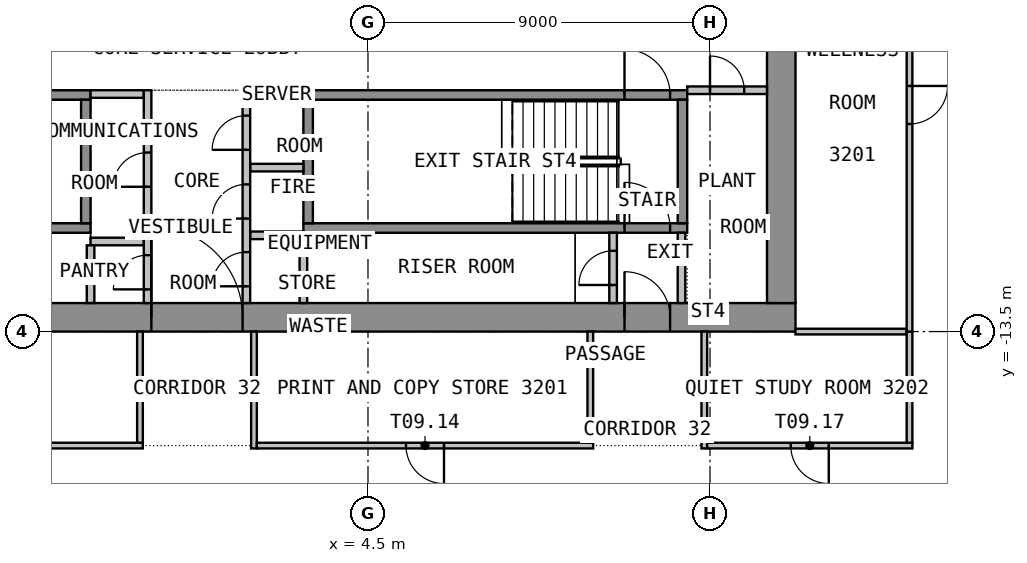
"""IFC4 building model, lengths in metres.
Left out: names, types, materials, properties, quantities, classifications, styles, units other than length and angle.
Written with IfcOpenShell. Run it as: python <this file> out.ifc"""

import sys

from ifc_helpers import new_model, si_unit, direction, frame, frame_2d, origin, place, context, subcontext, project, spatial, rectangle, extrude, element, fill, save


model = new_model("IFC4")
c1 = context("Model", 3, precision=1e-05, world=origin(), true_north=direction((0.0, 1.0)))
c2 = subcontext(c1, "Body", "Model", "MODEL_VIEW")
j1 = project(units=[si_unit("LENGTHUNIT", "METRE"), si_unit("PLANEANGLEUNIT", "RADIAN")], contexts=[c1])
p1 = place(None, origin())
s1 = spatial("IfcSite", under=j1, at=p1, CompositionType="ELEMENT")
p2 = place(p1, origin())
s2 = spatial("IfcBuilding", under=s1, at=p2, CompositionType="ELEMENT")
p3 = place(p2, frame((0.0, 0.0, 132.6)))
s3 = spatial("IfcBuildingStorey", under=s2, at=p3, CompositionType="ELEMENT", Elevation=132.6)
p4 = place(p3, frame((-15.75, -13.125, 0.0), z_axis=(0.0, 0.0, 1.0), x_axis=(1.0, 0.0, 0.0)))
e1 = element("IfcWall", 1, at=p4, inside=s3, PredefinedType="SHEAR", context=c2, shape_type="SweptSolid", body=[
    extrude(rectangle(XDim=31.5, YDim=0.75, at=frame_2d((15.75, 0.0))), origin(), (0.0, 0.0, 1.0), 3.575),
])
p5 = place(p4, frame((14.55, 0.0, 0.0)))
e2 = element("IfcOpeningElement", 2, at=p5, cuts=e1, PredefinedType="OPENING", context=c2, shape_type="SweptSolid", body=[
    extrude(rectangle(XDim=2.4, YDim=2.1, at=frame_2d((1.2, 1.05))), frame((0.0, 0.385, 0.0), z_axis=(0.0, -1.0, 0.0), x_axis=(1.0, 0.0, 0.0)), (0.0, 0.0, 1.0), 0.77),
])
p6 = place(p4, frame((3.3, 0.0, 0.0)))
e3 = element("IfcOpeningElement", 3, at=p6, cuts=e1, PredefinedType="OPENING", context=c2, shape_type="SweptSolid", body=[
    extrude(rectangle(XDim=1.2, YDim=2.1, at=frame_2d((0.6, 1.05))), frame((0.0, 0.385, 0.0), z_axis=(0.0, -1.0, 0.0), x_axis=(1.0, 0.0, 0.0)), (0.0, 0.0, 1.0), 0.77),
])
p7 = place(p4, frame((27.0, 0.0, 0.0)))
e4 = element("IfcOpeningElement", 4, at=p7, cuts=e1, PredefinedType="OPENING", context=c2, shape_type="SweptSolid", body=[
    extrude(rectangle(XDim=1.2, YDim=2.1, at=frame_2d((0.6, 1.05))), frame((0.0, 0.385, 0.0), z_axis=(0.0, -1.0, 0.0), x_axis=(1.0, 0.0, 0.0)), (0.0, 0.0, 1.0), 0.77),
])
p8 = place(p3, frame((15.375, -12.75, 0.0), z_axis=(0.0, 0.0, 1.0), x_axis=(0.0, 1.0, 0.0)))
e5 = element("IfcWall", 5, at=p8, inside=s3, PredefinedType="SHEAR", context=c2, shape_type="SweptSolid", body=[
    extrude(rectangle(XDim=25.5, YDim=0.75, at=frame_2d((12.75, 0.0))), origin(), (0.0, 0.0, 1.0), 3.575),
])
p9 = place(p8, frame((11.55, 0.0, 0.0)))
e6 = element("IfcOpeningElement", 6, at=p9, cuts=e5, PredefinedType="OPENING", context=c2, shape_type="SweptSolid", body=[
    extrude(rectangle(XDim=2.4, YDim=2.1, at=frame_2d((1.2, 1.05))), frame((0.0, 0.385, 0.0), z_axis=(0.0, -1.0, 0.0), x_axis=(1.0, 0.0, 0.0)), (0.0, 0.0, 1.0), 0.77),
])
p10 = place(p3, frame((-12.9, -10.775, 0.0), z_axis=(0.0, 0.0, 1.0), x_axis=(1.0, 0.0, 0.0)))
e7 = element("IfcWall", 7, at=p10, inside=s3, PredefinedType="SHEAR", context=c2, shape_type="SweptSolid", body=[
    extrude(rectangle(XDim=10.1, YDim=0.25, at=frame_2d((5.05, 0.0))), origin(), (0.0, 0.0, 1.0), 3.575),
])
p11 = place(p10, frame((0.45, 0.0, 0.0)))
e8 = element("IfcOpeningElement", 8, at=p11, cuts=e7, PredefinedType="OPENING", context=c2, shape_type="SweptSolid", body=[
    extrude(rectangle(XDim=1.2, YDim=2.1, at=frame_2d((0.6, 1.05))), frame((0.0, 0.135, 0.0), z_axis=(0.0, -1.0, 0.0), x_axis=(1.0, 0.0, 0.0)), (0.0, 0.0, 1.0), 0.27),
])
p12 = place(p3, frame((-12.9, -7.275, 0.0), z_axis=(0.0, 0.0, 1.0), x_axis=(1.0, 0.0, 0.0)))
e9 = element("IfcWall", 9, at=p12, inside=s3, PredefinedType="SHEAR", context=c2, shape_type="SweptSolid", body=[
    extrude(rectangle(XDim=10.1, YDim=0.25, at=frame_2d((5.05, 0.0))), origin(), (0.0, 0.0, 1.0), 3.575),
])
p13 = place(p12, frame((0.45, 0.0, 0.0)))
e10 = element("IfcOpeningElement", 10, at=p13, cuts=e9, PredefinedType="OPENING", context=c2, shape_type="SweptSolid", body=[
    extrude(rectangle(XDim=1.2, YDim=2.1, at=frame_2d((0.6, 1.05))), frame((0.0, 0.135, 0.0), z_axis=(0.0, -1.0, 0.0), x_axis=(1.0, 0.0, 0.0)), (0.0, 0.0, 1.0), 0.27),
])
p14 = place(p3, frame((-2.925, -10.65, 0.0), z_axis=(0.0, 0.0, 1.0), x_axis=(0.0, 1.0, 0.0)))
e11 = element("IfcWall", 11, at=p14, inside=s3, PredefinedType="SHEAR", context=c2, shape_type="SweptSolid", body=[
    extrude(rectangle(XDim=3.25, YDim=0.25, at=frame_2d((1.625, 0.0))), origin(), (0.0, 0.0, 1.0), 3.575),
])
p15 = place(p3, frame((2.8, -10.775, 0.0), z_axis=(0.0, 0.0, 1.0), x_axis=(1.0, 0.0, 0.0)))
e12 = element("IfcWall", 12, at=p15, inside=s3, PredefinedType="SHEAR", context=c2, shape_type="SweptSolid", body=[
    extrude(rectangle(XDim=10.1, YDim=0.25, at=frame_2d((5.05, 0.0))), origin(), (0.0, 0.0, 1.0), 3.575),
])
p16 = place(p15, frame((8.45, 0.0, 0.0)))
e13 = element("IfcOpeningElement", 13, at=p16, cuts=e12, PredefinedType="OPENING", context=c2, shape_type="SweptSolid", body=[
    extrude(rectangle(XDim=1.2, YDim=2.1, at=frame_2d((0.6, 1.05))), frame((0.0, 0.135, 0.0), z_axis=(0.0, -1.0, 0.0), x_axis=(1.0, 0.0, 0.0)), (0.0, 0.0, 1.0), 0.27),
])
p17 = place(p3, frame((2.8, -7.275, 0.0), z_axis=(0.0, 0.0, 1.0), x_axis=(1.0, 0.0, 0.0)))
e14 = element("IfcWall", 14, at=p17, inside=s3, PredefinedType="SHEAR", context=c2, shape_type="SweptSolid", body=[
    extrude(rectangle(XDim=10.1, YDim=0.25, at=frame_2d((5.05, 0.0))), origin(), (0.0, 0.0, 1.0), 3.575),
])
p18 = place(p17, frame((8.45, 0.0, 0.0)))
e15 = element("IfcOpeningElement", 15, at=p18, cuts=e14, PredefinedType="OPENING", context=c2, shape_type="SweptSolid", body=[
    extrude(rectangle(XDim=1.2, YDim=2.1, at=frame_2d((0.6, 1.05))), frame((0.0, 0.135, 0.0), z_axis=(0.0, -1.0, 0.0), x_axis=(1.0, 0.0, 0.0)), (0.0, 0.0, 1.0), 0.27),
])
for number, where, z_axis, x_axis in (
    (16, (2.925, -10.65, 0.0), (0.0, 0.0, 1.0), (0.0, 1.0, 0.0)),
    (17, (12.775, -10.65, 0.0), (0.0, 0.0, 1.0), (0.0, 1.0, 0.0)),
):
    element("IfcWall", number, at=place(p3, frame(where, z_axis=z_axis, x_axis=x_axis)), inside=s3, PredefinedType="SHEAR", context=c2, shape_type="SweptSolid", body=[
        extrude(rectangle(XDim=3.25, YDim=0.25, at=frame_2d((1.625, 0.0))), origin(), (0.0, 0.0, 1.0), 3.575),
    ])
for number, where, z_axis, x_axis in (
    (18, (-2.8, -7.25, 0.0), (0.0, 0.0, 1.0), (1.0, 0.0, 0.0)),
    (19, (-2.8, -11.13, 0.0), (0.0, 0.0, 1.0), (1.0, 0.0, 0.0)),
    (20, (1.4, -7.25, 0.0), (0.0, 0.0, 1.0), (1.0, 0.0, 0.0)),
    (21, (1.4, -9.186, 0.0), (0.0, 0.0, 1.0), (1.0, 0.0, 0.0)),
    (22, (1.4, -10.968, 0.0), (0.0, 0.0, 1.0), (1.0, 0.0, 0.0)),
):
    element("IfcWall", number, at=place(p3, frame(where, z_axis=z_axis, x_axis=x_axis)), inside=s3, PredefinedType="PARTITIONING", context=c2, shape_type="SweptSolid", body=[
        extrude(rectangle(XDim=1.4, YDim=0.2, at=frame_2d((0.7, 0.0))), origin(), (0.0, 0.0, 1.0), 3.575),
    ])
p19 = place(p3, frame((-1.3, -12.75, 0.0), z_axis=(0.0, 0.0, 1.0), x_axis=(0.0, 1.0, 0.0)))
e23 = element("IfcWall", 23, at=p19, inside=s3, PredefinedType="PARTITIONING", context=c2, shape_type="SweptSolid", body=[
    extrude(rectangle(XDim=5.6, YDim=0.2, at=frame_2d((2.8, 0.0))), origin(), (0.0, 0.0, 1.0), 3.575),
])
p20 = place(p19, frame((0.36, 0.0, 0.0)))
e24 = element("IfcOpeningElement", 24, at=p20, cuts=e23, PredefinedType="OPENING", context=c2, shape_type="SweptSolid", body=[
    extrude(rectangle(XDim=0.9, YDim=2.1, at=frame_2d((0.45, 1.05))), frame((0.0, 0.11, 0.0), z_axis=(0.0, -1.0, 0.0), x_axis=(1.0, 0.0, 0.0)), (0.0, 0.0, 1.0), 0.22),
])
p21 = place(p19, frame((3.06, 0.0, 0.0)))
e25 = element("IfcOpeningElement", 25, at=p21, cuts=e23, PredefinedType="OPENING", context=c2, shape_type="SweptSolid", body=[
    extrude(rectangle(XDim=0.9, YDim=2.1, at=frame_2d((0.45, 1.05))), frame((0.0, 0.11, 0.0), z_axis=(0.0, -1.0, 0.0), x_axis=(1.0, 0.0, 0.0)), (0.0, 0.0, 1.0), 0.22),
])
p22 = place(p3, frame((1.3, -12.75, 0.0), z_axis=(0.0, 0.0, 1.0), x_axis=(0.0, 1.0, 0.0)))
e26 = element("IfcWall", 26, at=p22, inside=s3, PredefinedType="PARTITIONING", context=c2, shape_type="SweptSolid", body=[
    extrude(rectangle(XDim=5.6, YDim=0.2, at=frame_2d((2.8, 0.0))), origin(), (0.0, 0.0, 1.0), 3.575),
])
p23 = place(p22, frame((0.441, 0.0, 0.0)))
e27 = element("IfcOpeningElement", 27, at=p23, cuts=e26, PredefinedType="OPENING", context=c2, shape_type="SweptSolid", body=[
    extrude(rectangle(XDim=0.9, YDim=2.1, at=frame_2d((0.45, 1.05))), frame((0.0, 0.11, 0.0), z_axis=(0.0, -1.0, 0.0), x_axis=(1.0, 0.0, 0.0)), (0.0, 0.0, 1.0), 0.22),
])
p24 = place(p22, frame((2.223, 0.0, 0.0)))
e28 = element("IfcOpeningElement", 28, at=p24, cuts=e26, PredefinedType="OPENING", context=c2, shape_type="SweptSolid", body=[
    extrude(rectangle(XDim=0.9, YDim=2.1, at=frame_2d((0.45, 1.05))), frame((0.0, 0.11, 0.0), z_axis=(0.0, -1.0, 0.0), x_axis=(1.0, 0.0, 0.0)), (0.0, 0.0, 1.0), 0.22),
])
p25 = place(p22, frame((4.032, 0.0, 0.0)))
e29 = element("IfcOpeningElement", 29, at=p25, cuts=e26, PredefinedType="OPENING", context=c2, shape_type="SweptSolid", body=[
    extrude(rectangle(XDim=0.9, YDim=2.1, at=frame_2d((0.45, 1.05))), frame((0.0, 0.11, 0.0), z_axis=(0.0, -1.0, 0.0), x_axis=(1.0, 0.0, 0.0)), (0.0, 0.0, 1.0), 0.22),
])
p26 = place(p3, frame((12.75, -12.75, 0.0), z_axis=(0.0, 0.0, 1.0), x_axis=(0.0, 1.0, 0.0)))
e30 = element("IfcWall", 30, at=p26, inside=s3, PredefinedType="PARTITIONING", context=c2, shape_type="SweptSolid", body=[
    extrude(rectangle(XDim=1.85, YDim=0.2, at=frame_2d((0.925, 0.0))), origin(), (0.0, 0.0, 1.0), 3.575),
])
p27 = place(p3, frame((10.95, -12.75, 0.0), z_axis=(0.0, 0.0, 1.0), x_axis=(0.0, 1.0, 0.0)))
e31 = element("IfcWall", 31, at=p27, inside=s3, PredefinedType="PARTITIONING", context=c2, shape_type="SweptSolid", body=[
    extrude(rectangle(XDim=1.85, YDim=0.2, at=frame_2d((0.925, 0.0))), origin(), (0.0, 0.0, 1.0), 3.575),
])
p28 = place(p27, frame((0.475, 0.0, 0.0)))
e32 = element("IfcOpeningElement", 32, at=p28, cuts=e31, PredefinedType="OPENING", context=c2, shape_type="SweptSolid", body=[
    extrude(rectangle(XDim=0.9, YDim=2.1, at=frame_2d((0.45, 1.05))), frame((0.0, 0.11, 0.0), z_axis=(0.0, -1.0, 0.0), x_axis=(1.0, 0.0, 0.0)), (0.0, 0.0, 1.0), 0.22),
])
p29 = place(p3, frame((12.9, -7.15, 0.0), z_axis=(0.0, 0.0, 1.0), x_axis=(1.0, 0.0, 0.0)))
e33 = element("IfcWall", 33, at=p29, inside=s3, PredefinedType="PARTITIONING", context=c2, shape_type="SweptSolid", body=[
    extrude(rectangle(XDim=2.1, YDim=0.2, at=frame_2d((1.05, 0.0))), origin(), (0.0, 0.0, 1.0), 3.575),
])
p30 = place(p29, frame((0.6, 0.0, 0.0)))
e34 = element("IfcOpeningElement", 34, at=p30, cuts=e33, PredefinedType="OPENING", context=c2, shape_type="SweptSolid", body=[
    extrude(rectangle(XDim=0.9, YDim=2.1, at=frame_2d((0.45, 1.05))), frame((0.0, 0.11, 0.0), z_axis=(0.0, -1.0, 0.0), x_axis=(1.0, 0.0, 0.0)), (0.0, 0.0, 1.0), 0.22),
])
p31 = place(p3, frame((-1.425, -16.5, 0.0), z_axis=(0.0, 0.0, 1.0), x_axis=(-1.0, 0.0, 0.0)))
e35 = element("IfcWall", 35, at=p31, inside=s3, PredefinedType="PARTITIONING", context=c2, shape_type="SweptSolid", body=[
    extrude(rectangle(XDim=8.85, YDim=0.15, at=frame_2d((4.425, 0.0))), origin(), (0.0, 0.0, 1.0), 3.575),
])
p32 = place(p31, frame((3.925, 0.0, 0.0)))
e36 = element("IfcOpeningElement", 36, at=p32, cuts=e35, PredefinedType="OPENING", context=c2, shape_type="SweptSolid", body=[
    extrude(rectangle(XDim=1.0, YDim=2.1, at=frame_2d((0.5, 1.05))), frame((0.0, 0.085, 0.0), z_axis=(0.0, -1.0, 0.0), x_axis=(1.0, 0.0, 0.0)), (0.0, 0.0, 1.0), 0.17),
])
p33 = place(p3, frame((-1.5, -13.5, 0.0), z_axis=(0.0, 0.0, 1.0), x_axis=(0.0, -1.0, 0.0)))
e37 = element("IfcWall", 37, at=p33, inside=s3, PredefinedType="PARTITIONING", context=c2, shape_type="SweptSolid", body=[
    extrude(rectangle(XDim=2.925, YDim=0.15, at=frame_2d((1.462, 0.0))), origin(), (0.0, 0.0, 1.0), 3.575),
])
p34 = place(p3, frame((1.5, -16.575, 0.0), z_axis=(0.0, 0.0, 1.0), x_axis=(0.0, 1.0, 0.0)))
e38 = element("IfcWall", 38, at=p34, inside=s3, PredefinedType="PARTITIONING", context=c2, shape_type="SweptSolid", body=[
    extrude(rectangle(XDim=3.075, YDim=0.15, at=frame_2d((1.538, 0.0))), origin(), (0.0, 0.0, 1.0), 3.575),
])
p35 = place(p3, frame((10.425, -16.5, 0.0), z_axis=(0.0, 0.0, 1.0), x_axis=(-1.0, 0.0, 0.0)))
e39 = element("IfcWall", 39, at=p35, inside=s3, PredefinedType="PARTITIONING", context=c2, shape_type="SweptSolid", body=[
    extrude(rectangle(XDim=8.85, YDim=0.15, at=frame_2d((4.425, 0.0))), origin(), (0.0, 0.0, 1.0), 3.575),
])
p36 = place(p35, frame((3.925, 0.0, 0.0)))
e40 = element("IfcOpeningElement", 40, at=p36, cuts=e39, PredefinedType="OPENING", context=c2, shape_type="SweptSolid", body=[
    extrude(rectangle(XDim=1.0, YDim=2.1, at=frame_2d((0.5, 1.05))), frame((0.0, 0.085, 0.0), z_axis=(0.0, -1.0, 0.0), x_axis=(1.0, 0.0, 0.0)), (0.0, 0.0, 1.0), 0.17),
])
p37 = place(p3, frame((10.35, -13.5, 0.0), z_axis=(0.0, 0.0, 1.0), x_axis=(0.0, -1.0, 0.0)))
e41 = element("IfcWall", 41, at=p37, inside=s3, PredefinedType="PARTITIONING", context=c2, shape_type="SweptSolid", body=[
    extrude(rectangle(XDim=2.925, YDim=0.15, at=frame_2d((1.462, 0.0))), origin(), (0.0, 0.0, 1.0), 3.575),
])
p38 = place(p3, frame((13.35, -16.575, 0.0), z_axis=(0.0, 0.0, 1.0), x_axis=(0.0, 1.0, 0.0)))
e42 = element("IfcWall", 42, at=p38, inside=s3, PredefinedType="PARTITIONING", context=c2, shape_type="SweptSolid", body=[
    extrude(rectangle(XDim=3.075, YDim=0.15, at=frame_2d((1.538, 0.0))), origin(), (0.0, 0.0, 1.0), 3.575),
])
p39 = place(p3, frame((18.825, -16.5, 0.0), z_axis=(0.0, 0.0, 1.0), x_axis=(-1.0, 0.0, 0.0)))
e43 = element("IfcWall", 43, at=p39, inside=s3, PredefinedType="PARTITIONING", context=c2, shape_type="SweptSolid", body=[
    extrude(rectangle(XDim=5.4, YDim=0.15, at=frame_2d((2.7, 0.0))), origin(), (0.0, 0.0, 1.0), 3.575),
])
p40 = place(p39, frame((2.2, 0.0, 0.0)))
e44 = element("IfcOpeningElement", 44, at=p40, cuts=e43, PredefinedType="OPENING", context=c2, shape_type="SweptSolid", body=[
    extrude(rectangle(XDim=1.0, YDim=2.1, at=frame_2d((0.5, 1.05))), frame((0.0, 0.085, 0.0), z_axis=(0.0, -1.0, 0.0), x_axis=(1.0, 0.0, 0.0)), (0.0, 0.0, 1.0), 0.17),
])
for number, where, z_axis, x_axis in (
    (45, (15.75, -13.5, 0.0), (0.0, 0.0, 1.0), (1.0, 0.0, 0.0)),
    (46, (18.75, -13.5, 0.0), (0.0, 0.0, 1.0), (0.0, -1.0, 0.0)),
):
    element("IfcWall", number, at=place(p3, frame(where, z_axis=z_axis, x_axis=x_axis)), inside=s3, PredefinedType="PARTITIONING", context=c2, shape_type="SweptSolid", body=[
        extrude(rectangle(XDim=2.925, YDim=0.15, at=frame_2d((1.462, 0.0))), origin(), (0.0, 0.0, 1.0), 3.575),
    ])
p41 = place(p3, frame((18.75, -1.575, 0.0), z_axis=(0.0, 0.0, 1.0), x_axis=(0.0, -1.0, 0.0)))
e47 = element("IfcWall", 47, at=p41, inside=s3, PredefinedType="PARTITIONING", context=c2, shape_type="SweptSolid", body=[
    extrude(rectangle(XDim=11.925, YDim=0.15, at=frame_2d((5.962, 0.0))), origin(), (0.0, 0.0, 1.0), 3.575),
])
p42 = place(p41, frame((5.462, 0.0, 0.0)))
e48 = element("IfcOpeningElement", 48, at=p42, cuts=e47, PredefinedType="OPENING", context=c2, shape_type="SweptSolid", body=[
    extrude(rectangle(XDim=1.0, YDim=2.1, at=frame_2d((0.5, 1.05))), frame((0.0, 0.085, 0.0), z_axis=(0.0, -1.0, 0.0), x_axis=(1.0, 0.0, 0.0)), (0.0, 0.0, 1.0), 0.17),
])
p43 = place(p3, frame((-2.8, -12.749, 0.0), z_axis=(0.0, 0.0, 1.0), x_axis=(0.0, 1.0, 0.0)))
e49 = element("IfcWall", 49, at=p43, inside=s3, PredefinedType="PARTITIONING", context=c2, shape_type="SweptSolid", body=[
    extrude(rectangle(XDim=1.518, YDim=0.2, at=frame_2d((0.759, 0.0))), origin(), (0.0, 0.0, 1.0), 3.575),
])
p44 = place(p3, frame((2.8, -11.069, 0.0), z_axis=(0.0, 0.0, 1.0), x_axis=(0.0, -1.0, 0.0)))
e50 = element("IfcWall", 50, at=p44, inside=s3, PredefinedType="PARTITIONING", context=c2, shape_type="SweptSolid", body=[
    extrude(rectangle(XDim=1.68, YDim=0.2, at=frame_2d((0.84, 0.0))), origin(), (0.0, 0.0, 1.0), 3.575),
])
p45 = place(p5, origin())
e51 = element("IfcDoor", 51, at=p45, inside=s3, OperationType="DOUBLE_DOOR_DOUBLE_SWING", PredefinedType="DOOR", context=c2, shape_type="SweptSolid", body=[
    extrude(rectangle(XDim=2.4, YDim=2.1, at=frame_2d((1.2, 1.05))), frame((0.0, 0.025, 0.0), z_axis=(0.0, -1.0, 0.0), x_axis=(1.0, 0.0, 0.0)), (0.0, 0.0, 1.0), 0.05),
])
fill(e2, e51)
p46 = place(p7, origin())
e52 = element("IfcDoor", 52, at=p46, inside=s3, OperationType="SINGLE_SWING_RIGHT", PredefinedType="DOOR", context=c2, shape_type="SweptSolid", body=[
    extrude(rectangle(XDim=1.2, YDim=2.1, at=frame_2d((0.6, 1.05))), frame((0.0, 0.025, 0.0), z_axis=(0.0, -1.0, 0.0), x_axis=(1.0, 0.0, 0.0)), (0.0, 0.0, 1.0), 0.05),
])
fill(e4, e52)
p47 = place(p18, origin())
e53 = element("IfcDoor", 53, at=p47, inside=s3, OperationType="SINGLE_SWING_LEFT", PredefinedType="DOOR", context=c2, shape_type="SweptSolid", body=[
    extrude(rectangle(XDim=1.2, YDim=2.1, at=frame_2d((0.6, 1.05))), frame((0.0, 0.025, 0.0), z_axis=(0.0, -1.0, 0.0), x_axis=(1.0, 0.0, 0.0)), (0.0, 0.0, 1.0), 0.05),
])
fill(e15, e53)
p48 = place(p20, origin())
e54 = element("IfcDoor", 54, at=p48, inside=s3, OperationType="SINGLE_SWING_LEFT", PredefinedType="DOOR", context=c2, shape_type="SweptSolid", body=[
    extrude(rectangle(XDim=0.9, YDim=2.1, at=frame_2d((0.45, 1.05))), frame((0.0, 0.025, 0.0), z_axis=(0.0, -1.0, 0.0), x_axis=(1.0, 0.0, 0.0)), (0.0, 0.0, 1.0), 0.05),
])
fill(e24, e54)
p49 = place(p21, origin())
e55 = element("IfcDoor", 55, at=p49, inside=s3, OperationType="SINGLE_SWING_LEFT", PredefinedType="DOOR", context=c2, shape_type="SweptSolid", body=[
    extrude(rectangle(XDim=0.9, YDim=2.1, at=frame_2d((0.45, 1.05))), frame((0.0, 0.025, 0.0), z_axis=(0.0, -1.0, 0.0), x_axis=(1.0, 0.0, 0.0)), (0.0, 0.0, 1.0), 0.05),
])
fill(e25, e55)
p50 = place(p23, origin())
e56 = element("IfcDoor", 56, at=p50, inside=s3, OperationType="SINGLE_SWING_LEFT", PredefinedType="DOOR", context=c2, shape_type="SweptSolid", body=[
    extrude(rectangle(XDim=0.9, YDim=2.1, at=frame_2d((0.45, 1.05))), frame((0.0, 0.025, 0.0), z_axis=(0.0, -1.0, 0.0), x_axis=(1.0, 0.0, 0.0)), (0.0, 0.0, 1.0), 0.05),
])
fill(e27, e56)
p51 = place(p24, origin())
e57 = element("IfcDoor", 57, at=p51, inside=s3, OperationType="SINGLE_SWING_LEFT", PredefinedType="DOOR", context=c2, shape_type="SweptSolid", body=[
    extrude(rectangle(XDim=0.9, YDim=2.1, at=frame_2d((0.45, 1.05))), frame((0.0, 0.025, 0.0), z_axis=(0.0, -1.0, 0.0), x_axis=(1.0, 0.0, 0.0)), (0.0, 0.0, 1.0), 0.05),
])
fill(e28, e57)
p52 = place(p25, origin())
e58 = element("IfcDoor", 58, at=p52, inside=s3, OperationType="SINGLE_SWING_LEFT", PredefinedType="DOOR", context=c2, shape_type="SweptSolid", body=[
    extrude(rectangle(XDim=0.9, YDim=2.1, at=frame_2d((0.45, 1.05))), frame((0.0, 0.025, 0.0), z_axis=(0.0, -1.0, 0.0), x_axis=(1.0, 0.0, 0.0)), (0.0, 0.0, 1.0), 0.05),
])
fill(e29, e58)
p53 = place(p16, origin())
e59 = element("IfcDoor", 59, at=p53, inside=s3, OperationType="SINGLE_SWING_RIGHT", PredefinedType="DOOR", context=c2, shape_type="SweptSolid", body=[
    extrude(rectangle(XDim=1.2, YDim=2.1, at=frame_2d((0.6, 1.05))), frame((0.0, 0.025, 0.0), z_axis=(0.0, -1.0, 0.0), x_axis=(1.0, 0.0, 0.0)), (0.0, 0.0, 1.0), 0.05),
])
fill(e13, e59)
p54 = place(p28, origin())
e60 = element("IfcDoor", 60, at=p54, inside=s3, OperationType="SINGLE_SWING_LEFT", PredefinedType="DOOR", context=c2, shape_type="SweptSolid", body=[
    extrude(rectangle(XDim=0.9, YDim=2.1, at=frame_2d((0.45, 1.05))), frame((0.0, 0.025, 0.0), z_axis=(0.0, -1.0, 0.0), x_axis=(1.0, 0.0, 0.0)), (0.0, 0.0, 1.0), 0.05),
])
fill(e32, e60)
p55 = place(p30, origin())
e61 = element("IfcDoor", 61, at=p55, inside=s3, OperationType="SINGLE_SWING_LEFT", PredefinedType="DOOR", context=c2, shape_type="SweptSolid", body=[
    extrude(rectangle(XDim=0.9, YDim=2.1, at=frame_2d((0.45, 1.05))), frame((0.0, 0.025, 0.0), z_axis=(0.0, -1.0, 0.0), x_axis=(1.0, 0.0, 0.0)), (0.0, 0.0, 1.0), 0.05),
])
fill(e34, e61)
p56 = place(p36, origin())
e62 = element("IfcDoor", 62, at=p56, inside=s3, OperationType="SINGLE_SWING_RIGHT", PredefinedType="DOOR", context=c2, shape_type="SweptSolid", body=[
    extrude(rectangle(XDim=1.0, YDim=2.1, at=frame_2d((0.5, 1.05))), frame((0.0, 0.025, 0.0), z_axis=(0.0, -1.0, 0.0), x_axis=(1.0, 0.0, 0.0)), (0.0, 0.0, 1.0), 0.05),
])
fill(e40, e62)
p57 = place(p40, origin())
e63 = element("IfcDoor", 63, at=p57, inside=s3, OperationType="SINGLE_SWING_RIGHT", PredefinedType="DOOR", context=c2, shape_type="SweptSolid", body=[
    extrude(rectangle(XDim=1.0, YDim=2.1, at=frame_2d((0.5, 1.05))), frame((0.0, 0.025, 0.0), z_axis=(0.0, -1.0, 0.0), x_axis=(1.0, 0.0, 0.0)), (0.0, 0.0, 1.0), 0.05),
])
fill(e44, e63)
p58 = place(p42, origin())
e64 = element("IfcDoor", 64, at=p58, inside=s3, OperationType="SINGLE_SWING_RIGHT", PredefinedType="DOOR", context=c2, shape_type="SweptSolid", body=[
    extrude(rectangle(XDim=1.0, YDim=2.1, at=frame_2d((0.5, 1.05))), frame((0.0, 0.025, 0.0), z_axis=(0.0, -1.0, 0.0), x_axis=(1.0, 0.0, 0.0)), (0.0, 0.0, 1.0), 0.05),
])
fill(e48, e64)
save(model, sys.argv[1])
